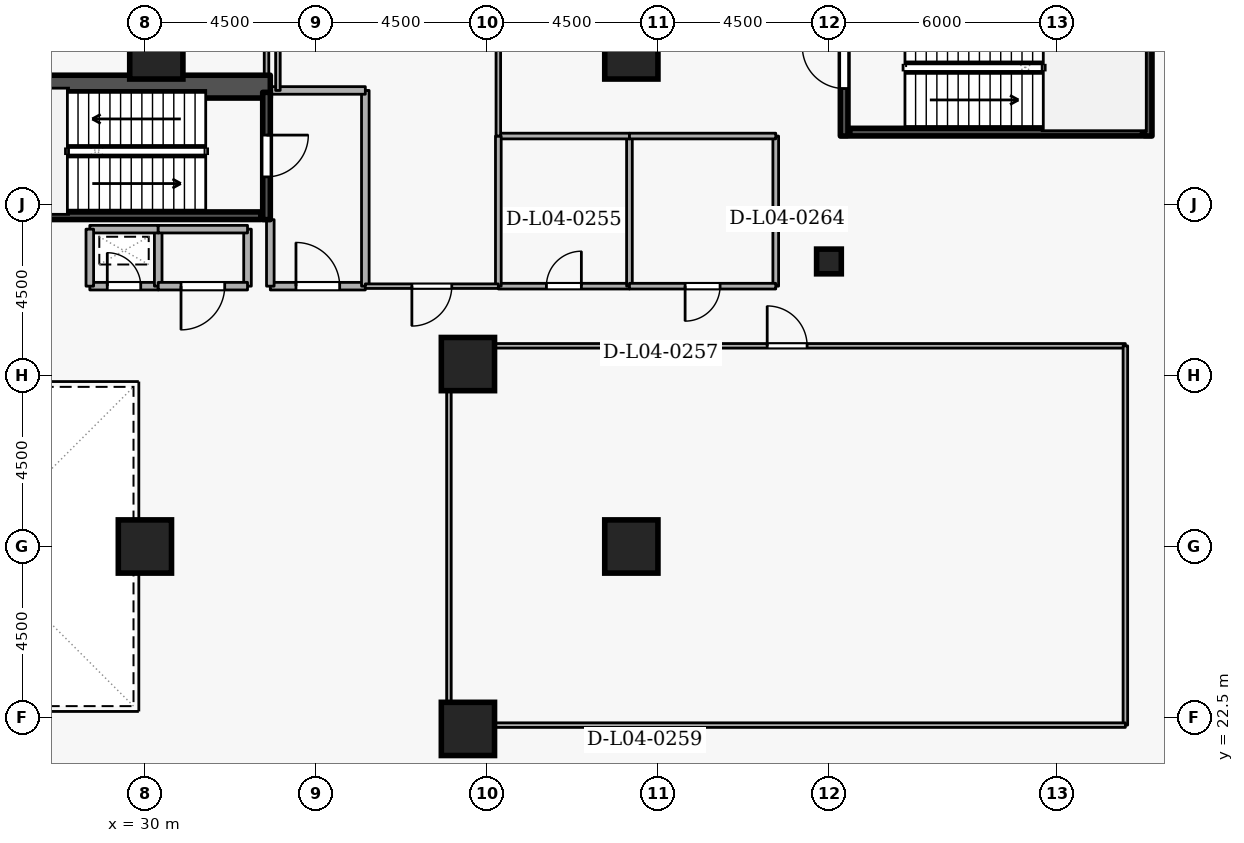
"""IFC4 building model, lengths in metres.
Left out: names, types, materials, properties, quantities, classifications, styles, units other than length and angle.
Written with IfcOpenShell. Run it as: python <this file> out.ifc"""

import sys

from ifc_helpers import new_model, si_unit, direction, frame, frame_2d, origin, origin_2d, place, context, subcontext, project, spatial, rectangle, extrude, element, fill, save


model = new_model("IFC4")
c1 = context("Model", 3, precision=1e-05, world=origin(), true_north=direction((0.0, 1.0)))
c2 = subcontext(c1, "Body", "Model", "MODEL_VIEW")
j1 = project(units=[si_unit("LENGTHUNIT", "METRE"), si_unit("PLANEANGLEUNIT", "RADIAN")], contexts=[c1])
p1 = place(None, origin())
s1 = spatial("IfcSite", under=j1, at=p1, CompositionType="ELEMENT")
p2 = place(p1, origin())
s2 = spatial("IfcBuilding", under=s1, at=p2, CompositionType="ELEMENT")
p3 = place(p2, frame((0.0, 0.0, 18.6)))
s3 = spatial("IfcBuildingStorey", under=s2, at=p3, CompositionType="ELEMENT", Elevation=18.6)
p4 = place(p3, frame((17.7, 39.1, 0.0), z_axis=(0.0, 0.0, 1.0), x_axis=(1.0, 0.0, 0.0)))
e1 = element("IfcWall", 1, at=p4, inside=s3, PredefinedType="SHEAR", context=c2, shape_type="SweptSolid", body=[
    extrude(rectangle(XDim=15.6, YDim=0.6, at=frame_2d((7.8, 0.0))), origin(), (0.0, 0.0, 1.0), 4.5),
])
for number, where, z_axis, x_axis in (
    (2, (42.8, 27.0, 0.0), (0.0, 0.0, 1.0), (1.0, 0.0, 0.0)),
    (3, (42.8, 40.0, 0.0), (0.0, 0.0, 1.0), (1.0, 0.0, 0.0)),
    (4, (38.5, 22.2, 0.0), (0.0, 0.0, 1.0), (1.0, 0.0, 0.0)),
    (5, (38.5, 31.8, 0.0), (0.0, 0.0, 1.0), (1.0, 0.0, 0.0)),
    (6, (30.3, 40.0, 0.0), (0.0, 0.0, 1.0), (1.0, 0.0, 0.0)),
    (7, (30.0, 27.0, 0.0), (0.0, 0.0, 1.0), (1.0, 0.0, 0.0)),
):
    element("IfcColumn", number, at=place(p3, frame(where, z_axis=z_axis, x_axis=x_axis)), inside=s3, PredefinedType="COLUMN", context=c2, shape_type="SweptSolid", body=[
        extrude(rectangle(XDim=1.4, YDim=1.4, at=origin_2d()), origin(), (0.0, 0.0, 1.0), 4.5),
    ])
p5 = place(p3, frame((48.0, 34.5, 0.0), z_axis=(0.0, 0.0, 1.0), x_axis=(1.0, 0.0, 0.0)))
e8 = element("IfcColumn", 8, at=p5, inside=s3, PredefinedType="COLUMN", context=c2, shape_type="SweptSolid", body=[
    extrude(rectangle(XDim=0.65, YDim=0.65, at=origin_2d()), origin(), (0.0, 0.0, 1.0), 4.5),
])
p6 = place(p3, frame((33.2, 38.95, 0.0), z_axis=(0.0, 0.0, 1.0), x_axis=(0.0, -1.0, 0.0)))
e9 = element("IfcWall", 9, at=p6, inside=s3, PredefinedType="SHEAR", context=c2, shape_type="SweptSolid", body=[
    extrude(rectangle(XDim=3.35, YDim=0.2, at=frame_2d((1.675, 0.0))), origin(), (0.0, 0.0, 1.0), 4.5),
])
p7 = place(p6, frame((1.125, 0.0, 0.0)))
e10 = element("IfcOpeningElement", 10, at=p7, cuts=e9, PredefinedType="OPENING", context=c2, shape_type="SweptSolid", body=[
    extrude(rectangle(XDim=1.1, YDim=2.1, at=frame_2d((0.55, 1.05))), frame((0.0, 0.11, 0.0), z_axis=(0.0, -1.0, 0.0), x_axis=(1.0, 0.0, 0.0)), (0.0, 0.0, 1.0), 0.22),
])
p8 = place(p3, frame((25.95, 35.703, 0.0), z_axis=(0.0, 0.0, 1.0), x_axis=(1.0, 0.0, 0.0)))
e11 = element("IfcWall", 11, at=p8, inside=s3, PredefinedType="SHEAR", context=c2, shape_type="SweptSolid", body=[
    extrude(rectangle(XDim=7.1, YDim=0.2, at=frame_2d((3.55, 0.0))), origin(), (0.0, 0.0, 1.0), 4.5),
])
p9 = place(p3, frame((48.4, 37.8, 0.0), z_axis=(0.0, 0.0, 1.0), x_axis=(0.0, 1.0, 0.0)))
e12 = element("IfcWall", 12, at=p9, inside=s3, PredefinedType="SHEAR", context=c2, shape_type="SweptSolid", body=[
    extrude(rectangle(XDim=3.6, YDim=0.2, at=frame_2d((1.8, 0.0))), origin(), (0.0, 0.0, 1.0), 4.5),
])
p10 = place(p9, frame((1.25, 0.0, 0.0)))
e13 = element("IfcOpeningElement", 13, at=p10, cuts=e12, PredefinedType="OPENING", context=c2, shape_type="SweptSolid", body=[
    extrude(rectangle(XDim=1.1, YDim=2.1, at=frame_2d((0.55, 1.05))), frame((0.0, 0.11, 0.0), z_axis=(0.0, -1.0, 0.0), x_axis=(1.0, 0.0, 0.0)), (0.0, 0.0, 1.0), 0.22),
])
p11 = place(p3, frame((56.4, 41.4, 0.0), z_axis=(0.0, 0.0, 1.0), x_axis=(0.0, -1.0, 0.0)))
e14 = element("IfcWall", 14, at=p11, inside=s3, PredefinedType="SHEAR", context=c2, shape_type="SweptSolid", body=[
    extrude(rectangle(XDim=3.6, YDim=0.2, at=frame_2d((1.8, 0.0))), origin(), (0.0, 0.0, 1.0), 4.5),
])
p12 = place(p3, frame((48.55, 37.903, 0.0), z_axis=(0.0, 0.0, 1.0), x_axis=(1.0, 0.0, 0.0)))
e15 = element("IfcWall", 15, at=p12, inside=s3, PredefinedType="SHEAR", context=c2, shape_type="SweptSolid", body=[
    extrude(rectangle(XDim=7.7, YDim=0.2, at=frame_2d((3.85, 0.0))), origin(), (0.0, 0.0, 1.0), 4.5),
])
p13 = place(p3, frame((33.3, 33.85, 0.0), z_axis=(0.0, 0.0, 1.0), x_axis=(1.0, 0.0, 0.0)))
e16 = element("IfcWall", 16, at=p13, inside=s3, PredefinedType="STANDARD", context=c2, shape_type="SweptSolid", body=[
    extrude(rectangle(XDim=2.5, YDim=0.2, at=frame_2d((1.25, 0.0))), origin(), (0.0, 0.0, 1.0), 4.16),
])
p14 = place(p13, frame((0.675, 0.0, 0.0)))
e17 = element("IfcOpeningElement", 17, at=p14, cuts=e16, PredefinedType="OPENING", context=c2, shape_type="SweptSolid", body=[
    extrude(rectangle(XDim=1.15, YDim=2.1, at=frame_2d((0.575, 1.05))), frame((0.0, 0.11, 0.0), z_axis=(0.0, -1.0, 0.0), x_axis=(1.0, 0.0, 0.0)), (0.0, 0.0, 1.0), 0.22),
])
p15 = place(p3, frame((35.8, 33.85, 0.0), z_axis=(0.0, 0.0, 1.0), x_axis=(0.0, 1.0, 0.0)))
e18 = element("IfcWall", 18, at=p15, inside=s3, PredefinedType="STANDARD", context=c2, shape_type="SweptSolid", body=[
    extrude(rectangle(XDim=5.15, YDim=0.2, at=frame_2d((2.575, 0.0))), origin(), (0.0, 0.0, 1.0), 4.16),
])
p16 = place(p3, frame((35.8, 39.0, 0.0), z_axis=(0.0, 0.0, 1.0), x_axis=(-1.0, 0.0, 0.0)))
e19 = element("IfcWall", 19, at=p16, inside=s3, PredefinedType="STANDARD", context=c2, shape_type="SweptSolid", body=[
    extrude(rectangle(XDim=2.5, YDim=0.2, at=frame_2d((1.25, 0.0))), origin(), (0.0, 0.0, 1.0), 4.16),
])
p17 = place(p3, frame((33.3, 35.6, 0.0), z_axis=(0.0, 0.0, 1.0), x_axis=(0.0, -1.0, 0.0)))
e20 = element("IfcWall", 20, at=p17, inside=s3, PredefinedType="STANDARD", context=c2, shape_type="SweptSolid", body=[
    extrude(rectangle(XDim=1.75, YDim=0.2, at=frame_2d((0.875, 0.0))), origin(), (0.0, 0.0, 1.0), 3.365),
])
p18 = place(p3, frame((28.55, 33.85, 0.0), z_axis=(0.0, 0.0, 1.0), x_axis=(1.0, 0.0, 0.0)))
e21 = element("IfcWall", 21, at=p18, inside=s3, PredefinedType="STANDARD", context=c2, shape_type="SweptSolid", body=[
    extrude(rectangle(XDim=1.8, YDim=0.2, at=frame_2d((0.9, 0.0))), origin(), (0.0, 0.0, 1.0), 4.16),
])
p19 = place(p18, frame((0.46, 0.0, 0.0)))
e22 = element("IfcOpeningElement", 22, at=p19, cuts=e21, PredefinedType="OPENING", context=c2, shape_type="SweptSolid", body=[
    extrude(rectangle(XDim=0.88, YDim=2.04, at=frame_2d((0.44, 1.02))), frame((0.0, 0.11, 0.0), z_axis=(0.0, -1.0, 0.0), x_axis=(1.0, 0.0, 0.0)), (0.0, 0.0, 1.0), 0.22),
])
p20 = place(p3, frame((30.35, 33.85, 0.0), z_axis=(0.0, 0.0, 1.0), x_axis=(0.0, 1.0, 0.0)))
e23 = element("IfcWall", 23, at=p20, inside=s3, PredefinedType="STANDARD", context=c2, shape_type="SweptSolid", body=[
    extrude(rectangle(XDim=1.5, YDim=0.2, at=frame_2d((0.75, 0.0))), origin(), (0.0, 0.0, 1.0), 4.16),
])
p21 = place(p3, frame((30.35, 35.35, 0.0), z_axis=(0.0, 0.0, 1.0), x_axis=(-1.0, 0.0, 0.0)))
e24 = element("IfcWall", 24, at=p21, inside=s3, PredefinedType="STANDARD", context=c2, shape_type="SweptSolid", body=[
    extrude(rectangle(XDim=1.8, YDim=0.2, at=frame_2d((0.9, 0.0))), origin(), (0.0, 0.0, 1.0), 4.16),
])
p22 = place(p3, frame((28.55, 35.35, 0.0), z_axis=(0.0, 0.0, 1.0), x_axis=(0.0, -1.0, 0.0)))
e25 = element("IfcWall", 25, at=p22, inside=s3, PredefinedType="STANDARD", context=c2, shape_type="SweptSolid", body=[
    extrude(rectangle(XDim=1.5, YDim=0.2, at=frame_2d((0.75, 0.0))), origin(), (0.0, 0.0, 1.0), 4.16),
])
p23 = place(p3, frame((32.7, 35.35, 0.0), z_axis=(0.0, 0.0, 1.0), x_axis=(0.0, -1.0, 0.0)))
e26 = element("IfcWall", 26, at=p23, inside=s3, PredefinedType="STANDARD", context=c2, shape_type="SweptSolid", body=[
    extrude(rectangle(XDim=1.5, YDim=0.2, at=frame_2d((0.75, 0.0))), origin(), (0.0, 0.0, 1.0), 3.365),
])
p24 = place(p3, frame((32.7, 33.85, 0.0), z_axis=(0.0, 0.0, 1.0), x_axis=(-1.0, 0.0, 0.0)))
e27 = element("IfcWall", 27, at=p24, inside=s3, PredefinedType="STANDARD", context=c2, shape_type="SweptSolid", body=[
    extrude(rectangle(XDim=2.35, YDim=0.2, at=frame_2d((1.175, 0.0))), origin(), (0.0, 0.0, 1.0), 4.16),
])
p25 = place(p24, frame((0.6, 0.0, 0.0)))
e28 = element("IfcOpeningElement", 28, at=p25, cuts=e27, PredefinedType="OPENING", context=c2, shape_type="SweptSolid", body=[
    extrude(rectangle(XDim=1.15, YDim=2.1, at=frame_2d((0.575, 1.05))), frame((0.0, 0.11, 0.0), z_axis=(0.0, -1.0, 0.0), x_axis=(1.0, 0.0, 0.0)), (0.0, 0.0, 1.0), 0.22),
])
p26 = place(p3, frame((30.35, 35.35, 0.0), z_axis=(0.0, 0.0, 1.0), x_axis=(1.0, 0.0, 0.0)))
e29 = element("IfcWall", 29, at=p26, inside=s3, PredefinedType="STANDARD", context=c2, shape_type="SweptSolid", body=[
    extrude(rectangle(XDim=2.35, YDim=0.2, at=frame_2d((1.175, 0.0))), origin(), (0.0, 0.0, 1.0), 4.16),
])
p27 = place(p3, frame((39.3, 33.85, 0.0), z_axis=(0.0, 0.0, 1.0), x_axis=(1.0, 0.0, 0.0)))
e30 = element("IfcWall", 30, at=p27, inside=s3, PredefinedType="PARTITIONING", context=c2, shape_type="SweptSolid", body=[
    extrude(rectangle(XDim=3.45, YDim=0.15, at=frame_2d((1.725, 0.0))), origin(), (0.0, 0.0, 1.0), 4.16),
])
p28 = place(p27, frame((1.265, 0.0, 0.0)))
e31 = element("IfcOpeningElement", 31, at=p28, cuts=e30, PredefinedType="OPENING", context=c2, shape_type="SweptSolid", body=[
    extrude(rectangle(XDim=0.92, YDim=2.08, at=frame_2d((0.46, 1.04))), frame((0.0, 0.085, 0.0), z_axis=(0.0, -1.0, 0.0), x_axis=(1.0, 0.0, 0.0)), (0.0, 0.0, 1.0), 0.17),
])
p29 = place(p3, frame((42.75, 33.85, 0.0), z_axis=(0.0, 0.0, 1.0), x_axis=(0.0, 1.0, 0.0)))
e32 = element("IfcWall", 32, at=p29, inside=s3, PredefinedType="PARTITIONING", context=c2, shape_type="SweptSolid", body=[
    extrude(rectangle(XDim=3.95, YDim=0.15, at=frame_2d((1.975, 0.0))), origin(), (0.0, 0.0, 1.0), 3.395),
])
p30 = place(p3, frame((42.75, 37.8, 0.0), z_axis=(0.0, 0.0, 1.0), x_axis=(-1.0, 0.0, 0.0)))
e33 = element("IfcWall", 33, at=p30, inside=s3, PredefinedType="PARTITIONING", context=c2, shape_type="SweptSolid", body=[
    extrude(rectangle(XDim=3.45, YDim=0.15, at=frame_2d((1.725, 0.0))), origin(), (0.0, 0.0, 1.0), 4.16),
])
for number, where, z_axis, x_axis in (
    (34, (39.3, 37.8, 0.0), (0.0, 0.0, 1.0), (0.0, -1.0, 0.0)),
    (35, (46.6, 37.8, 0.0), (0.0, 0.0, 1.0), (0.0, -1.0, 0.0)),
):
    element("IfcWall", number, at=place(p3, frame(where, z_axis=z_axis, x_axis=x_axis)), inside=s3, PredefinedType="PARTITIONING", context=c2, shape_type="SweptSolid", body=[
        extrude(rectangle(XDim=3.95, YDim=0.15, at=frame_2d((1.975, 0.0))), origin(), (0.0, 0.0, 1.0), 4.16),
    ])
p31 = place(p3, frame((46.6, 33.85, 0.0), z_axis=(0.0, 0.0, 1.0), x_axis=(-1.0, 0.0, 0.0)))
e36 = element("IfcWall", 36, at=p31, inside=s3, PredefinedType="PARTITIONING", context=c2, shape_type="SweptSolid", body=[
    extrude(rectangle(XDim=3.85, YDim=0.15, at=frame_2d((1.925, 0.0))), origin(), (0.0, 0.0, 1.0), 4.16),
])
p32 = place(p31, frame((1.465, 0.0, 0.0)))
e37 = element("IfcOpeningElement", 37, at=p32, cuts=e36, PredefinedType="OPENING", context=c2, shape_type="SweptSolid", body=[
    extrude(rectangle(XDim=0.92, YDim=2.08, at=frame_2d((0.46, 1.04))), frame((0.0, 0.085, 0.0), z_axis=(0.0, -1.0, 0.0), x_axis=(1.0, 0.0, 0.0)), (0.0, 0.0, 1.0), 0.17),
])
p33 = place(p3, frame((42.75, 37.8, 0.0), z_axis=(0.0, 0.0, 1.0), x_axis=(1.0, 0.0, 0.0)))
e38 = element("IfcWall", 38, at=p33, inside=s3, PredefinedType="PARTITIONING", context=c2, shape_type="SweptSolid", body=[
    extrude(rectangle(XDim=3.85, YDim=0.15, at=frame_2d((1.925, 0.0))), origin(), (0.0, 0.0, 1.0), 4.16),
])
p34 = place(p3, frame((38.0, 32.28, 0.0), z_axis=(0.0, 0.0, 1.0), x_axis=(1.0, 0.0, 0.0)))
e39 = element("IfcWall", 39, at=p34, inside=s3, PredefinedType="PARTITIONING", context=c2, shape_type="SweptSolid", body=[
    extrude(rectangle(XDim=17.8, YDim=0.12, at=frame_2d((8.9, 0.0))), origin(), (0.0, 0.0, 1.0), 4.16),
])
p35 = place(p34, frame((8.375, 0.0, 0.0)))
e40 = element("IfcOpeningElement", 40, at=p35, cuts=e39, PredefinedType="OPENING", context=c2, shape_type="SweptSolid", body=[
    extrude(rectangle(XDim=1.05, YDim=2.1, at=frame_2d((0.525, 1.05))), frame((0.0, 0.07, 0.0), z_axis=(0.0, -1.0, 0.0), x_axis=(1.0, 0.0, 0.0)), (0.0, 0.0, 1.0), 0.14),
])
p36 = place(p3, frame((55.8, 32.28, 0.0), z_axis=(0.0, 0.0, 1.0), x_axis=(0.0, -1.0, 0.0)))
e41 = element("IfcWall", 41, at=p36, inside=s3, PredefinedType="PARTITIONING", context=c2, shape_type="SweptSolid", body=[
    extrude(rectangle(XDim=9.98, YDim=0.12, at=frame_2d((4.99, 0.0))), origin(), (0.0, 0.0, 1.0), 4.16),
])
p37 = place(p3, frame((55.8, 22.3, 0.0), z_axis=(0.0, 0.0, 1.0), x_axis=(-1.0, 0.0, 0.0)))
e42 = element("IfcWall", 42, at=p37, inside=s3, PredefinedType="PARTITIONING", context=c2, shape_type="SweptSolid", body=[
    extrude(rectangle(XDim=17.8, YDim=0.12, at=frame_2d((8.9, 0.0))), origin(), (0.0, 0.0, 1.0), 4.16),
])
p38 = place(p3, frame((38.0, 22.3, 0.0), z_axis=(0.0, 0.0, 1.0), x_axis=(0.0, 1.0, 0.0)))
e43 = element("IfcWall", 43, at=p38, inside=s3, PredefinedType="PARTITIONING", context=c2, shape_type="SweptSolid", body=[
    extrude(rectangle(XDim=9.98, YDim=0.12, at=frame_2d((4.99, 0.0))), origin(), (0.0, 0.0, 1.0), 4.16),
])
p39 = place(p3, frame((39.3, 49.18, 0.0), z_axis=(0.0, 0.0, 1.0), x_axis=(0.0, -1.0, 0.0)))
e44 = element("IfcWall", 44, at=p39, inside=s3, PredefinedType="PARTITIONING", context=c2, shape_type="SweptSolid", body=[
    extrude(rectangle(XDim=11.38, YDim=0.12, at=frame_2d((5.69, 0.0))), origin(), (0.0, 0.0, 1.0), 4.16),
])
p40 = place(p3, frame((39.3, 33.85, 0.0), z_axis=(0.0, 0.0, 1.0), x_axis=(-1.0, 0.0, 0.0)))
e45 = element("IfcWall", 45, at=p40, inside=s3, PredefinedType="PARTITIONING", context=c2, shape_type="SweptSolid", body=[
    extrude(rectangle(XDim=3.5, YDim=0.12, at=frame_2d((1.75, 0.0))), origin(), (0.0, 0.0, 1.0), 4.16),
])
p41 = place(p40, frame((1.225, 0.0, 0.0)))
e46 = element("IfcOpeningElement", 46, at=p41, cuts=e45, PredefinedType="OPENING", context=c2, shape_type="SweptSolid", body=[
    extrude(rectangle(XDim=1.05, YDim=2.1, at=frame_2d((0.525, 1.05))), frame((0.0, 0.07, 0.0), z_axis=(0.0, -1.0, 0.0), x_axis=(1.0, 0.0, 0.0)), (0.0, 0.0, 1.0), 0.14),
])
p42 = place(p3, frame((33.5, 39.0, 0.0), z_axis=(0.0, 0.0, 1.0), x_axis=(0.0, 1.0, 0.0)))
e47 = element("IfcWall", 47, at=p42, inside=s3, PredefinedType="PARTITIONING", context=c2, shape_type="SweptSolid", body=[
    extrude(rectangle(XDim=10.18, YDim=0.12, at=frame_2d((5.09, 0.0))), origin(), (0.0, 0.0, 1.0), 4.16),
])
p43 = place(p3, frame((33.2, 49.18, 0.0), z_axis=(0.0, 0.0, 1.0), x_axis=(0.0, -1.0, 0.0)))
e48 = element("IfcWall", 48, at=p43, inside=s3, PredefinedType="PARTITIONING", context=c2, shape_type="SweptSolid", body=[
    extrude(rectangle(XDim=9.98, YDim=0.12, at=frame_2d((4.99, 0.0))), origin(), (0.0, 0.0, 1.0), 4.16),
])
p44 = place(p7, origin())
e49 = element("IfcDoor", 49, at=p44, inside=s3, OperationType="SINGLE_SWING_LEFT", PredefinedType="DOOR", context=c2, shape_type="SweptSolid", body=[
    extrude(rectangle(XDim=1.1, YDim=2.1, at=frame_2d((0.55, 1.05))), frame((0.0, 0.025, 0.0), z_axis=(0.0, -1.0, 0.0), x_axis=(1.0, 0.0, 0.0)), (0.0, 0.0, 1.0), 0.05),
])
fill(e10, e49)
p45 = place(p10, origin())
e50 = element("IfcDoor", 50, at=p45, inside=s3, OperationType="SINGLE_SWING_RIGHT", PredefinedType="DOOR", context=c2, shape_type="SweptSolid", body=[
    extrude(rectangle(XDim=1.1, YDim=2.1, at=frame_2d((0.55, 1.05))), frame((0.0, 0.025, 0.0), z_axis=(0.0, -1.0, 0.0), x_axis=(1.0, 0.0, 0.0)), (0.0, 0.0, 1.0), 0.05),
])
fill(e13, e50)
p46 = place(p14, origin())
e51 = element("IfcDoor", 51, at=p46, inside=s3, OperationType="SINGLE_SWING_LEFT", PredefinedType="DOOR", context=c2, shape_type="SweptSolid", body=[
    extrude(rectangle(XDim=1.15, YDim=2.1, at=frame_2d((0.575, 1.05))), frame((0.0, 0.025, 0.0), z_axis=(0.0, -1.0, 0.0), x_axis=(1.0, 0.0, 0.0)), (0.0, 0.0, 1.0), 0.05),
])
fill(e17, e51)
p47 = place(p19, origin())
e52 = element("IfcDoor", 52, at=p47, inside=s3, OperationType="SINGLE_SWING_LEFT", PredefinedType="DOOR", context=c2, shape_type="SweptSolid", body=[
    extrude(rectangle(XDim=0.88, YDim=2.04, at=frame_2d((0.44, 1.02))), frame((0.0, 0.025, 0.0), z_axis=(0.0, -1.0, 0.0), x_axis=(1.0, 0.0, 0.0)), (0.0, 0.0, 1.0), 0.05),
])
fill(e22, e52)
p48 = place(p25, origin())
e53 = element("IfcDoor", 53, at=p48, inside=s3, OperationType="SINGLE_SWING_RIGHT", PredefinedType="DOOR", context=c2, shape_type="SweptSolid", body=[
    extrude(rectangle(XDim=1.15, YDim=2.1, at=frame_2d((0.575, 1.05))), frame((0.0, 0.025, 0.0), z_axis=(0.0, -1.0, 0.0), x_axis=(1.0, 0.0, 0.0)), (0.0, 0.0, 1.0), 0.05),
])
fill(e28, e53)
p49 = place(p28, origin())
e54 = element("IfcDoor", 54, at=p49, inside=s3, OperationType="SINGLE_SWING_RIGHT", PredefinedType="DOOR", context=c2, shape_type="SweptSolid", body=[
    extrude(rectangle(XDim=0.92, YDim=2.08, at=frame_2d((0.46, 1.04))), frame((0.0, 0.025, 0.0), z_axis=(0.0, -1.0, 0.0), x_axis=(1.0, 0.0, 0.0)), (0.0, 0.0, 1.0), 0.05),
])
fill(e31, e54)
p50 = place(p32, origin())
e55 = element("IfcDoor", 55, at=p50, inside=s3, OperationType="SINGLE_SWING_RIGHT", PredefinedType="DOOR", context=c2, shape_type="SweptSolid", body=[
    extrude(rectangle(XDim=0.92, YDim=2.08, at=frame_2d((0.46, 1.04))), frame((0.0, 0.025, 0.0), z_axis=(0.0, -1.0, 0.0), x_axis=(1.0, 0.0, 0.0)), (0.0, 0.0, 1.0), 0.05),
])
fill(e37, e55)
p51 = place(p35, origin())
e56 = element("IfcDoor", 56, at=p51, inside=s3, OperationType="SINGLE_SWING_LEFT", PredefinedType="DOOR", context=c2, shape_type="SweptSolid", body=[
    extrude(rectangle(XDim=1.05, YDim=2.1, at=frame_2d((0.525, 1.05))), frame((0.0, 0.025, 0.0), z_axis=(0.0, -1.0, 0.0), x_axis=(1.0, 0.0, 0.0)), (0.0, 0.0, 1.0), 0.05),
])
fill(e40, e56)
p52 = place(p41, origin())
e57 = element("IfcDoor", 57, at=p52, inside=s3, OperationType="SINGLE_SWING_RIGHT", PredefinedType="DOOR", context=c2, shape_type="SweptSolid", body=[
    extrude(rectangle(XDim=1.05, YDim=2.1, at=frame_2d((0.525, 1.05))), frame((0.0, 0.025, 0.0), z_axis=(0.0, -1.0, 0.0), x_axis=(1.0, 0.0, 0.0)), (0.0, 0.0, 1.0), 0.05),
])
fill(e46, e57)
save(model, sys.argv[1])
